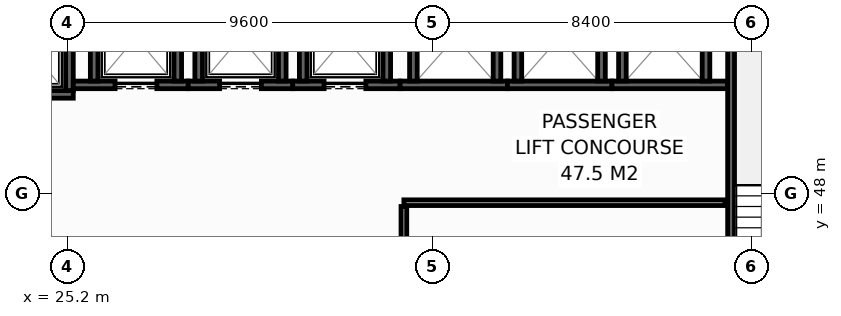
"""IFC4 building model, lengths in metres.
Left out: names, types, materials, properties, quantities, classifications, styles, units other than length and angle.
Written with IfcOpenShell. Run it as: python <this file> out.ifc"""

import sys

from ifc_helpers import new_model, si_unit, direction, frame, frame_2d, origin, place, context, subcontext, project, spatial, rectangle, extrude, element, fill, save


model = new_model("IFC4")
c1 = context("Model", 3, precision=1e-05, world=origin(), true_north=direction((0.0, 1.0)))
c2 = subcontext(c1, "Body", "Model", "MODEL_VIEW")
j1 = project(units=[si_unit("LENGTHUNIT", "METRE"), si_unit("PLANEANGLEUNIT", "RADIAN")], contexts=[c1])
p1 = place(None, origin())
s1 = spatial("IfcSite", under=j1, at=p1, CompositionType="ELEMENT")
p2 = place(p1, origin())
s2 = spatial("IfcBuilding", under=s1, at=p2, CompositionType="ELEMENT")
p3 = place(p2, frame((0.0, 0.0, 114.8)))
s3 = spatial("IfcBuildingStorey", under=s2, at=p3, CompositionType="ELEMENT", Elevation=114.8)
p4 = place(p3, frame((22.5, 50.6, 0.0), z_axis=(0.0, 0.0, 1.0), x_axis=(1.0, 0.0, 0.0)))
e1 = element("IfcWall", 1, at=p4, inside=s3, PredefinedType="SHEAR", context=c2, shape_type="SweptSolid", body=[
    extrude(rectangle(XDim=2.85, YDim=0.2, at=frame_2d((1.425, 0.0))), origin(), (0.0, 0.0, 1.0), 4.15),
])
p5 = place(p4, frame((0.925, 0.0, 0.0)))
e2 = element("IfcOpeningElement", 2, at=p5, cuts=e1, PredefinedType="OPENING", context=c2, shape_type="SweptSolid", body=[
    extrude(rectangle(XDim=1.25, YDim=2.3, at=frame_2d((0.625, 1.15))), frame((0.0, 0.11, 0.0), z_axis=(0.0, -1.0, 0.0), x_axis=(1.0, 0.0, 0.0)), (0.0, 0.0, 1.0), 0.22),
])
p6 = place(p3, frame((25.25, 50.7, 0.0), z_axis=(0.0, 0.0, 1.0), x_axis=(0.0, 1.0, 0.0)))
e3 = element("IfcWall", 3, at=p6, inside=s3, PredefinedType="SHEAR", context=c2, shape_type="SweptSolid", body=[
    extrude(rectangle(XDim=2.6, YDim=0.2, at=frame_2d((1.3, 0.0))), origin(), (0.0, 0.0, 1.0), 4.15),
])
p7 = place(p3, frame((25.35, 50.85, 0.0), z_axis=(0.0, 0.0, 1.0), x_axis=(1.0, 0.0, 0.0)))
e4 = element("IfcWall", 4, at=p7, inside=s3, PredefinedType="SHEAR", context=c2, shape_type="SweptSolid", body=[
    extrude(rectangle(XDim=3.025, YDim=0.2, at=frame_2d((1.512, 0.0))), origin(), (0.0, 0.0, 1.0), 4.15),
])
p8 = place(p7, frame((1.1, 0.0, 0.0)))
e5 = element("IfcOpeningElement", 5, at=p8, cuts=e4, PredefinedType="OPENING", context=c2, shape_type="SweptSolid", body=[
    extrude(rectangle(XDim=1.1, YDim=2.2, at=frame_2d((0.55, 1.1))), frame((0.0, 0.11, 0.0), z_axis=(0.0, -1.0, 0.0), x_axis=(1.0, 0.0, 0.0)), (0.0, 0.0, 1.0), 0.22),
])
for number, where, z_axis, x_axis in (
    (6, (25.9, 50.95, 0.0), (0.0, 0.0, 1.0), (0.0, 1.0, 0.0)),
    (7, (28.1, 50.95, 0.0), (0.0, 0.0, 1.0), (0.0, 1.0, 0.0)),
):
    element("IfcWall", number, at=place(p3, frame(where, z_axis=z_axis, x_axis=x_axis)), inside=s3, PredefinedType="SHEAR", context=c2, shape_type="SweptSolid", body=[
        extrude(rectangle(XDim=2.3, YDim=0.2, at=frame_2d((1.15, 0.0))), origin(), (0.0, 0.0, 1.0), 4.15),
    ])
p9 = place(p3, frame((28.375, 50.85, 0.0), z_axis=(0.0, 0.0, 1.0), x_axis=(1.0, 0.0, 0.0)))
e8 = element("IfcWall", 8, at=p9, inside=s3, PredefinedType="SHEAR", context=c2, shape_type="SweptSolid", body=[
    extrude(rectangle(XDim=2.75, YDim=0.2, at=frame_2d((1.375, 0.0))), origin(), (0.0, 0.0, 1.0), 4.15),
])
p10 = place(p9, frame((0.825, 0.0, 0.0)))
e9 = element("IfcOpeningElement", 9, at=p10, cuts=e8, PredefinedType="OPENING", context=c2, shape_type="SweptSolid", body=[
    extrude(rectangle(XDim=1.1, YDim=2.2, at=frame_2d((0.55, 1.1))), frame((0.0, 0.11, 0.0), z_axis=(0.0, -1.0, 0.0), x_axis=(1.0, 0.0, 0.0)), (0.0, 0.0, 1.0), 0.22),
])
for number, where, z_axis, x_axis in (
    (10, (28.65, 50.95, 0.0), (0.0, 0.0, 1.0), (0.0, 1.0, 0.0)),
    (11, (30.85, 50.95, 0.0), (0.0, 0.0, 1.0), (0.0, 1.0, 0.0)),
):
    element("IfcWall", number, at=place(p3, frame(where, z_axis=z_axis, x_axis=x_axis)), inside=s3, PredefinedType="SHEAR", context=c2, shape_type="SweptSolid", body=[
        extrude(rectangle(XDim=2.3, YDim=0.2, at=frame_2d((1.15, 0.0))), origin(), (0.0, 0.0, 1.0), 4.15),
    ])
p11 = place(p3, frame((31.125, 50.85, 0.0), z_axis=(0.0, 0.0, 1.0), x_axis=(1.0, 0.0, 0.0)))
e12 = element("IfcWall", 12, at=p11, inside=s3, PredefinedType="SHEAR", context=c2, shape_type="SweptSolid", body=[
    extrude(rectangle(XDim=2.825, YDim=0.2, at=frame_2d((1.413, 0.0))), origin(), (0.0, 0.0, 1.0), 4.15),
])
p12 = place(p11, frame((0.825, 0.0, 0.0)))
e13 = element("IfcOpeningElement", 13, at=p12, cuts=e12, PredefinedType="OPENING", context=c2, shape_type="SweptSolid", body=[
    extrude(rectangle(XDim=1.1, YDim=2.2, at=frame_2d((0.55, 1.1))), frame((0.0, 0.11, 0.0), z_axis=(0.0, -1.0, 0.0), x_axis=(1.0, 0.0, 0.0)), (0.0, 0.0, 1.0), 0.22),
])
for number, where, z_axis, x_axis in (
    (14, (31.4, 50.95, 0.0), (0.0, 0.0, 1.0), (0.0, 1.0, 0.0)),
    (15, (33.6, 50.95, 0.0), (0.0, 0.0, 1.0), (0.0, 1.0, 0.0)),
):
    element("IfcWall", number, at=place(p3, frame(where, z_axis=z_axis, x_axis=x_axis)), inside=s3, PredefinedType="SHEAR", context=c2, shape_type="SweptSolid", body=[
        extrude(rectangle(XDim=2.3, YDim=0.2, at=frame_2d((1.15, 0.0))), origin(), (0.0, 0.0, 1.0), 4.15),
    ])
p13 = place(p3, frame((33.95, 50.85, 0.0), z_axis=(0.0, 0.0, 1.0), x_axis=(1.0, 0.0, 0.0)))
e16 = element("IfcWall", 16, at=p13, inside=s3, PredefinedType="SHEAR", context=c2, shape_type="SweptSolid", body=[
    extrude(rectangle(XDim=2.825, YDim=0.2, at=frame_2d((1.413, 0.0))), origin(), (0.0, 0.0, 1.0), 4.15),
])
for number, where, z_axis, x_axis in (
    (17, (34.3, 50.95, 0.0), (0.0, 0.0, 1.0), (0.0, 1.0, 0.0)),
    (18, (36.5, 50.95, 0.0), (0.0, 0.0, 1.0), (0.0, 1.0, 0.0)),
):
    element("IfcWall", number, at=place(p3, frame(where, z_axis=z_axis, x_axis=x_axis)), inside=s3, PredefinedType="SHEAR", context=c2, shape_type="SweptSolid", body=[
        extrude(rectangle(XDim=2.3, YDim=0.2, at=frame_2d((1.15, 0.0))), origin(), (0.0, 0.0, 1.0), 4.15),
    ])
p14 = place(p3, frame((36.775, 50.85, 0.0), z_axis=(0.0, 0.0, 1.0), x_axis=(1.0, 0.0, 0.0)))
e19 = element("IfcWall", 19, at=p14, inside=s3, PredefinedType="SHEAR", context=c2, shape_type="SweptSolid", body=[
    extrude(rectangle(XDim=2.75, YDim=0.2, at=frame_2d((1.375, 0.0))), origin(), (0.0, 0.0, 1.0), 4.15),
])
for number, where, z_axis, x_axis in (
    (20, (37.05, 50.95, 0.0), (0.0, 0.0, 1.0), (0.0, 1.0, 0.0)),
    (21, (39.25, 50.95, 0.0), (0.0, 0.0, 1.0), (0.0, 1.0, 0.0)),
):
    element("IfcWall", number, at=place(p3, frame(where, z_axis=z_axis, x_axis=x_axis)), inside=s3, PredefinedType="SHEAR", context=c2, shape_type="SweptSolid", body=[
        extrude(rectangle(XDim=2.3, YDim=0.2, at=frame_2d((1.15, 0.0))), origin(), (0.0, 0.0, 1.0), 4.15),
    ])
p15 = place(p3, frame((39.525, 50.85, 0.0), z_axis=(0.0, 0.0, 1.0), x_axis=(1.0, 0.0, 0.0)))
e22 = element("IfcWall", 22, at=p15, inside=s3, PredefinedType="SHEAR", context=c2, shape_type="SweptSolid", body=[
    extrude(rectangle(XDim=3.045, YDim=0.2, at=frame_2d((1.522, 0.0))), origin(), (0.0, 0.0, 1.0), 4.15),
])
for number, where, z_axis, x_axis in (
    (23, (39.8, 50.95, 0.0), (0.0, 0.0, 1.0), (0.0, 1.0, 0.0)),
    (24, (42.0, 50.95, 0.0), (0.0, 0.0, 1.0), (0.0, 1.0, 0.0)),
):
    element("IfcWall", number, at=place(p3, frame(where, z_axis=z_axis, x_axis=x_axis)), inside=s3, PredefinedType="SHEAR", context=c2, shape_type="SweptSolid", body=[
        extrude(rectangle(XDim=2.3, YDim=0.2, at=frame_2d((1.15, 0.0))), origin(), (0.0, 0.0, 1.0), 4.15),
    ])
p16 = place(p3, frame((42.66, 53.8, 0.0), z_axis=(0.0, 0.0, 1.0), x_axis=(0.0, -1.0, 0.0)))
e25 = element("IfcWall", 25, at=p16, inside=s3, PredefinedType="SHEAR", context=c2, shape_type="SweptSolid", body=[
    extrude(rectangle(XDim=10.4, YDim=0.18, at=frame_2d((5.2, 0.0))), origin(), (0.0, 0.0, 1.0), 4.15),
])
p17 = place(p16, frame((8.99, 0.0, 0.0)))
e26 = element("IfcOpeningElement", 26, at=p17, cuts=e25, PredefinedType="OPENING", context=c2, shape_type="SweptSolid", body=[
    extrude(rectangle(XDim=1.1, YDim=2.15, at=frame_2d((0.55, 1.075))), frame((0.0, 0.1, 0.0), z_axis=(0.0, -1.0, 0.0), x_axis=(1.0, 0.0, 0.0)), (0.0, 0.0, 1.0), 0.2),
])
p18 = place(p3, frame((34.05, 47.75, 0.0), z_axis=(0.0, 0.0, 1.0), x_axis=(1.0, 0.0, 0.0)))
e27 = element("IfcWall", 27, at=p18, inside=s3, PredefinedType="PARTITIONING", context=c2, shape_type="SweptSolid", body=[
    extrude(rectangle(XDim=8.45, YDim=0.15, at=frame_2d((4.225, 0.0))), origin(), (0.0, 0.0, 1.0), 4.15),
])
p19 = place(p3, frame((34.05, 45.22, 0.0), z_axis=(0.0, 0.0, 1.0), x_axis=(0.0, 1.0, 0.0)))
e28 = element("IfcWall", 28, at=p19, inside=s3, PredefinedType="PARTITIONING", context=c2, shape_type="SweptSolid", body=[
    extrude(rectangle(XDim=2.43, YDim=0.15, at=frame_2d((1.215, 0.0))), origin(), (0.0, 0.0, 1.0), 4.15),
])
p20 = place(p8, origin())
e29 = element("IfcDoor", 29, at=p20, inside=s3, OperationType="SLIDING_TO_LEFT", PredefinedType="DOOR", context=c2, shape_type="SweptSolid", body=[
    extrude(rectangle(XDim=1.1, YDim=2.2, at=frame_2d((0.55, 1.1))), frame((0.0, 0.025, 0.0), z_axis=(0.0, -1.0, 0.0), x_axis=(1.0, 0.0, 0.0)), (0.0, 0.0, 1.0), 0.05),
])
fill(e5, e29)
p21 = place(p10, origin())
e30 = element("IfcDoor", 30, at=p21, inside=s3, OperationType="SLIDING_TO_LEFT", PredefinedType="DOOR", context=c2, shape_type="SweptSolid", body=[
    extrude(rectangle(XDim=1.1, YDim=2.2, at=frame_2d((0.55, 1.1))), frame((0.0, 0.025, 0.0), z_axis=(0.0, -1.0, 0.0), x_axis=(1.0, 0.0, 0.0)), (0.0, 0.0, 1.0), 0.05),
])
fill(e9, e30)
p22 = place(p12, origin())
e31 = element("IfcDoor", 31, at=p22, inside=s3, OperationType="SLIDING_TO_LEFT", PredefinedType="DOOR", context=c2, shape_type="SweptSolid", body=[
    extrude(rectangle(XDim=1.1, YDim=2.2, at=frame_2d((0.55, 1.1))), frame((0.0, 0.025, 0.0), z_axis=(0.0, -1.0, 0.0), x_axis=(1.0, 0.0, 0.0)), (0.0, 0.0, 1.0), 0.05),
])
fill(e13, e31)
save(model, sys.argv[1])
